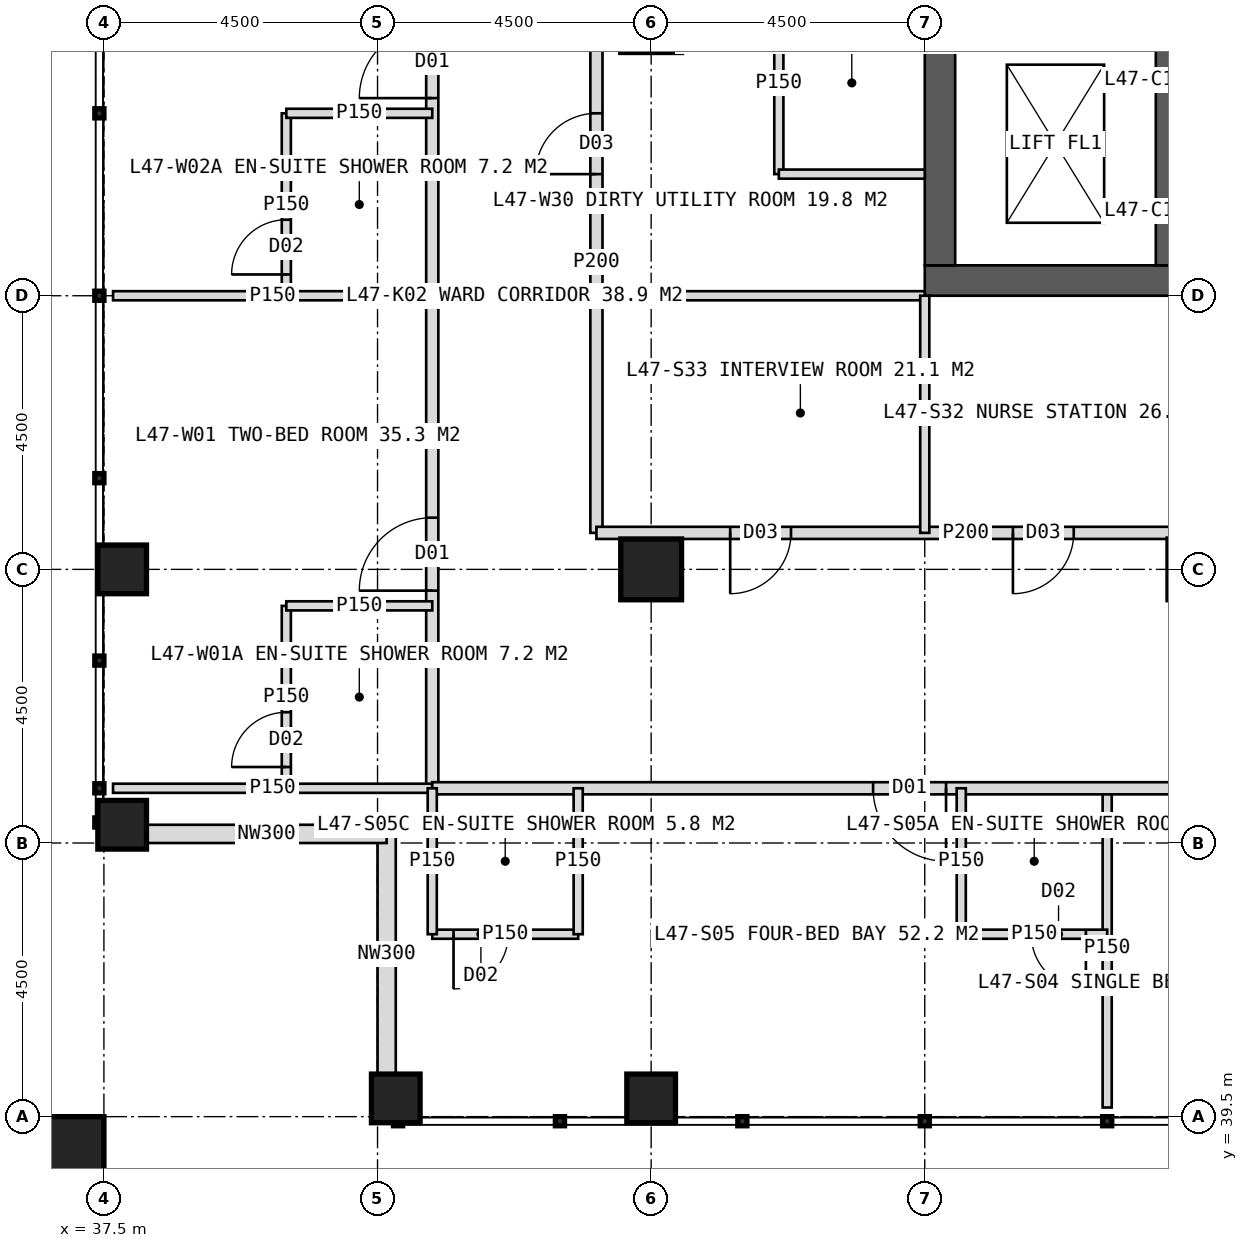
"""IFC4 building model, lengths in metres.
Left out: names, types, materials, properties, quantities, classifications, styles, units other than length and angle.
Written with IfcOpenShell. Run it as: python <this file> out.ifc"""

import sys

from ifc_helpers import new_model, si_unit, direction, frame, frame_2d, origin, origin_2d, place, context, subcontext, project, spatial, rectangle, hollow_rectangle, extrude, element, fill, save


model = new_model("IFC4")
c1 = context("Model", 3, precision=1e-05, world=origin(), true_north=direction((0.0, 1.0)))
c2 = subcontext(c1, "Body", "Model", "MODEL_VIEW")
j1 = project(units=[si_unit("LENGTHUNIT", "METRE"), si_unit("PLANEANGLEUNIT", "RADIAN")], contexts=[c1])
p1 = place(None, origin())
s1 = spatial("IfcSite", under=j1, at=p1, CompositionType="ELEMENT")
p2 = place(p1, origin())
s2 = spatial("IfcBuilding", under=s1, at=p2, CompositionType="ELEMENT")
p3 = place(p2, frame((0.0, 0.0, 197.0)))
s3 = spatial("IfcBuildingStorey", under=s2, at=p3, CompositionType="ELEMENT", Elevation=197.0)
p4 = place(p3, frame((51.0, 53.25, 0.0), z_axis=(0.0, 0.0, 1.0), x_axis=(1.0, 0.0, 0.0)))
e1 = element("IfcWall", 1, at=p4, inside=s3, PredefinedType="SHEAR", context=c2, shape_type="SweptSolid", body=[
    extrude(rectangle(XDim=18.0, YDim=0.5, at=frame_2d((9.0, 0.0))), origin(), (0.0, 0.0, 1.0), 4.0),
])
p5 = place(p4, frame((8.1, 0.0, 0.0)))
e2 = element("IfcOpeningElement", 2, at=p5, cuts=e1, PredefinedType="OPENING", context=c2, shape_type="SweptSolid", body=[
    extrude(rectangle(XDim=1.8, YDim=2.2, at=frame_2d((0.9, 1.1))), frame((0.0, 0.26, 0.0), z_axis=(0.0, -1.0, 0.0), x_axis=(1.0, 0.0, 0.0)), (0.0, 0.0, 1.0), 0.52),
])
p6 = place(p3, frame((51.25, 53.5, 0.0), z_axis=(0.0, 0.0, 1.0), x_axis=(0.0, 1.0, 0.0)))
e3 = element("IfcWall", 3, at=p6, inside=s3, PredefinedType="SHEAR", context=c2, shape_type="SweptSolid", body=[
    extrude(rectangle(XDim=17.0, YDim=0.5, at=frame_2d((8.5, 0.0))), origin(), (0.0, 0.0, 1.0), 4.0),
])
p7 = place(p6, frame((6.1, 0.0, 0.0)))
e4 = element("IfcOpeningElement", 4, at=p7, cuts=e3, PredefinedType="OPENING", context=c2, shape_type="SweptSolid", body=[
    extrude(rectangle(XDim=1.5, YDim=2.2, at=frame_2d((0.75, 1.1))), frame((0.0, 0.26, 0.0), z_axis=(0.0, -1.0, 0.0), x_axis=(1.0, 0.0, 0.0)), (0.0, 0.0, 1.0), 0.52),
])
p8 = place(p3, frame((54.95, 53.5, 0.0), z_axis=(0.0, 0.0, 1.0), x_axis=(0.0, 1.0, 0.0)))
e5 = element("IfcWall", 5, at=p8, inside=s3, PredefinedType="SHEAR", context=c2, shape_type="SweptSolid", body=[
    extrude(rectangle(XDim=17.0, YDim=0.3, at=frame_2d((8.5, 0.0))), origin(), (0.0, 0.0, 1.0), 4.0),
])
p9 = place(p3, frame((46.5, 48.5, 0.0), z_axis=(0.0, 0.0, 1.0), x_axis=(1.0, 0.0, 0.0)))
e6 = element("IfcColumn", 6, at=p9, inside=s3, PredefinedType="COLUMN", context=c2, shape_type="SweptSolid", body=[
    extrude(hollow_rectangle(XDim=1.0, YDim=1.0, WallThickness=0.1, at=origin_2d()), origin(), (0.0, 0.0, 1.0), 4.0),
])
for number, where, z_axis, x_axis in (
    (7, (42.3, 39.8, 0.0), (0.0, 0.0, 1.0), (1.0, 0.0, 0.0)),
    (8, (37.8, 44.3, 0.0), (0.0, 0.0, 1.0), (1.0, 0.0, 0.0)),
    (9, (46.5, 39.8, 0.0), (0.0, 0.0, 1.0), (1.0, 0.0, 0.0)),
    (10, (37.8, 48.5, 0.0), (0.0, 0.0, 1.0), (1.0, 0.0, 0.0)),
):
    element("IfcColumn", number, at=place(p3, frame(where, z_axis=z_axis, x_axis=x_axis)), inside=s3, PredefinedType="COLUMN", context=c2, shape_type="SweptSolid", body=[
        extrude(hollow_rectangle(XDim=0.8, YDim=0.8, WallThickness=0.08, at=origin_2d()), origin(), (0.0, 0.0, 1.0), 4.0),
    ])
p10 = place(p3, frame((36.9, 38.9, 0.0), z_axis=(0.0, 0.0, 1.0), x_axis=(1.0, 0.0, 0.0)))
e11 = element("IfcColumn", 11, at=p10, inside=s3, PredefinedType="COLUMN", context=c2, shape_type="SweptSolid", body=[
    extrude(hollow_rectangle(XDim=1.2, YDim=1.2, WallThickness=0.07, at=origin_2d()), origin(), (0.0, 0.0, 1.0), 4.0),
])
for number, where, z_axis, x_axis in (
    (12, (42.15, 40.2, 0.0), (0.0, 0.0, 1.0), (0.0, 1.0, 0.0)),
    (13, (42.15, 44.15, 0.0), (0.0, 0.0, 1.0), (-1.0, 0.0, 0.0)),
):
    element("IfcWall", number, at=place(p3, frame(where, z_axis=z_axis, x_axis=x_axis)), inside=s3, PredefinedType="ELEMENTEDWALL", context=c2, shape_type="SweptSolid", body=[
        extrude(rectangle(XDim=3.95, YDim=0.3, at=frame_2d((1.975, 0.0))), origin(), (0.0, 0.0, 1.0), 2.85),
    ])
p11 = place(p3, frame((42.9, 53.0, 0.0), z_axis=(0.0, 0.0, 1.0), x_axis=(-1.0, 0.0, 0.0)))
e14 = element("IfcWall", 14, at=p11, inside=s3, PredefinedType="PARTITIONING", context=c2, shape_type="SweptSolid", body=[
    extrude(rectangle(XDim=5.25, YDim=0.15, at=frame_2d((2.625, 0.0))), origin(), (0.0, 0.0, 1.0), 3.75),
])
p12 = place(p3, frame((42.9, 44.9, 0.0), z_axis=(0.0, 0.0, 1.0), x_axis=(0.0, 1.0, 0.0)))
e15 = element("IfcWall", 15, at=p12, inside=s3, PredefinedType="PARTITIONING", context=c2, shape_type="SweptSolid", body=[
    extrude(rectangle(XDim=34.2, YDim=0.2, at=frame_2d((17.1, 0.0))), origin(), (0.0, 0.0, 1.0), 3.75),
])
p13 = place(p12, frame((3.25, 0.0, 0.0)))
e16 = element("IfcOpeningElement", 16, at=p13, cuts=e15, PredefinedType="OPENING", context=c2, shape_type="SweptSolid", body=[
    extrude(rectangle(XDim=1.2, YDim=2.2, at=frame_2d((0.6, 1.1))), frame((0.0, 0.11, 0.0), z_axis=(0.0, -1.0, 0.0), x_axis=(1.0, 0.0, 0.0)), (0.0, 0.0, 1.0), 0.22),
])
p14 = place(p12, frame((11.35, 0.0, 0.0)))
e17 = element("IfcOpeningElement", 17, at=p14, cuts=e15, PredefinedType="OPENING", context=c2, shape_type="SweptSolid", body=[
    extrude(rectangle(XDim=1.2, YDim=2.2, at=frame_2d((0.6, 1.1))), frame((0.0, 0.11, 0.0), z_axis=(0.0, -1.0, 0.0), x_axis=(1.0, 0.0, 0.0)), (0.0, 0.0, 1.0), 0.22),
])
p15 = place(p12, frame((20.35, 0.0, 0.0)))
e18 = element("IfcOpeningElement", 18, at=p15, cuts=e15, PredefinedType="OPENING", context=c2, shape_type="SweptSolid", body=[
    extrude(rectangle(XDim=1.2, YDim=2.2, at=frame_2d((0.6, 1.1))), frame((0.0, 0.11, 0.0), z_axis=(0.0, -1.0, 0.0), x_axis=(1.0, 0.0, 0.0)), (0.0, 0.0, 1.0), 0.22),
])
p16 = place(p12, frame((29.35, 0.0, 0.0)))
e19 = element("IfcOpeningElement", 19, at=p16, cuts=e15, PredefinedType="OPENING", context=c2, shape_type="SweptSolid", body=[
    extrude(rectangle(XDim=1.2, YDim=2.2, at=frame_2d((0.6, 1.1))), frame((0.0, 0.11, 0.0), z_axis=(0.0, -1.0, 0.0), x_axis=(1.0, 0.0, 0.0)), (0.0, 0.0, 1.0), 0.22),
])
p17 = place(p3, frame((42.9, 44.9, 0.0), z_axis=(0.0, 0.0, 1.0), x_axis=(-1.0, 0.0, 0.0)))
e20 = element("IfcWall", 20, at=p17, inside=s3, PredefinedType="PARTITIONING", context=c2, shape_type="SweptSolid", body=[
    extrude(rectangle(XDim=5.25, YDim=0.15, at=frame_2d((2.625, 0.0))), origin(), (0.0, 0.0, 1.0), 3.75),
])
p18 = place(p3, frame((40.5, 44.9, 0.0), z_axis=(0.0, 0.0, 1.0), x_axis=(0.0, 1.0, 0.0)))
e21 = element("IfcWall", 21, at=p18, inside=s3, PredefinedType="PARTITIONING", context=c2, shape_type="SweptSolid", body=[
    extrude(rectangle(XDim=3.0, YDim=0.15, at=frame_2d((1.5, 0.0))), origin(), (0.0, 0.0, 1.0), 3.75),
])
p19 = place(p18, frame((0.35, 0.0, 0.0)))
e22 = element("IfcOpeningElement", 22, at=p19, cuts=e21, PredefinedType="OPENING", context=c2, shape_type="SweptSolid", body=[
    extrude(rectangle(XDim=0.9, YDim=2.1, at=frame_2d((0.45, 1.05))), frame((0.0, 0.085, 0.0), z_axis=(0.0, -1.0, 0.0), x_axis=(1.0, 0.0, 0.0)), (0.0, 0.0, 1.0), 0.17),
])
p20 = place(p3, frame((42.9, 47.9, 0.0), z_axis=(0.0, 0.0, 1.0), x_axis=(-1.0, 0.0, 0.0)))
e23 = element("IfcWall", 23, at=p20, inside=s3, PredefinedType="PARTITIONING", context=c2, shape_type="SweptSolid", body=[
    extrude(rectangle(XDim=2.4, YDim=0.15, at=frame_2d((1.2, 0.0))), origin(), (0.0, 0.0, 1.0), 3.75),
])
p21 = place(p3, frame((40.5, 53.0, 0.0), z_axis=(0.0, 0.0, 1.0), x_axis=(0.0, 1.0, 0.0)))
e24 = element("IfcWall", 24, at=p21, inside=s3, PredefinedType="PARTITIONING", context=c2, shape_type="SweptSolid", body=[
    extrude(rectangle(XDim=3.0, YDim=0.15, at=frame_2d((1.5, 0.0))), origin(), (0.0, 0.0, 1.0), 3.75),
])
p22 = place(p21, frame((0.35, 0.0, 0.0)))
e25 = element("IfcOpeningElement", 25, at=p22, cuts=e24, PredefinedType="OPENING", context=c2, shape_type="SweptSolid", body=[
    extrude(rectangle(XDim=0.9, YDim=2.1, at=frame_2d((0.45, 1.05))), frame((0.0, 0.085, 0.0), z_axis=(0.0, -1.0, 0.0), x_axis=(1.0, 0.0, 0.0)), (0.0, 0.0, 1.0), 0.17),
])
p23 = place(p3, frame((42.9, 56.0, 0.0), z_axis=(0.0, 0.0, 1.0), x_axis=(-1.0, 0.0, 0.0)))
e26 = element("IfcWall", 26, at=p23, inside=s3, PredefinedType="PARTITIONING", context=c2, shape_type="SweptSolid", body=[
    extrude(rectangle(XDim=2.4, YDim=0.15, at=frame_2d((1.2, 0.0))), origin(), (0.0, 0.0, 1.0), 3.75),
])
p24 = place(p3, frame((51.0, 53.0, 0.0), z_axis=(0.0, 0.0, 1.0), x_axis=(-1.0, 0.0, 0.0)))
e27 = element("IfcWall", 27, at=p24, inside=s3, PredefinedType="PARTITIONING", context=c2, shape_type="SweptSolid", body=[
    extrude(rectangle(XDim=5.4, YDim=0.15, at=frame_2d((2.7, 0.0))), origin(), (0.0, 0.0, 1.0), 3.75),
])
p25 = place(p3, frame((45.6, 49.1, 0.0), z_axis=(0.0, 0.0, 1.0), x_axis=(0.0, 1.0, 0.0)))
e28 = element("IfcWall", 28, at=p25, inside=s3, PredefinedType="PARTITIONING", context=c2, shape_type="SweptSolid", body=[
    extrude(rectangle(XDim=8.9, YDim=0.2, at=frame_2d((4.45, 0.0))), origin(), (0.0, 0.0, 1.0), 3.75),
])
p26 = place(p25, frame((5.9, 0.0, 0.0)))
e29 = element("IfcOpeningElement", 29, at=p26, cuts=e28, PredefinedType="OPENING", context=c2, shape_type="SweptSolid", body=[
    extrude(rectangle(XDim=1.0, YDim=2.1, at=frame_2d((0.5, 1.05))), frame((0.0, 0.11, 0.0), z_axis=(0.0, -1.0, 0.0), x_axis=(1.0, 0.0, 0.0)), (0.0, 0.0, 1.0), 0.22),
])
p27 = place(p3, frame((48.6, 55.0, 0.0), z_axis=(0.0, 0.0, 1.0), x_axis=(0.0, 1.0, 0.0)))
e30 = element("IfcWall", 30, at=p27, inside=s3, PredefinedType="PARTITIONING", context=c2, shape_type="SweptSolid", body=[
    extrude(rectangle(XDim=3.0, YDim=0.15, at=frame_2d((1.5, 0.0))), origin(), (0.0, 0.0, 1.0), 3.75),
])
p28 = place(p3, frame((51.0, 55.0, 0.0), z_axis=(0.0, 0.0, 1.0), x_axis=(-1.0, 0.0, 0.0)))
e31 = element("IfcWall", 31, at=p28, inside=s3, PredefinedType="PARTITIONING", context=c2, shape_type="SweptSolid", body=[
    extrude(rectangle(XDim=2.4, YDim=0.15, at=frame_2d((1.2, 0.0))), origin(), (0.0, 0.0, 1.0), 3.75),
])
p29 = place(p3, frame((54.0, 44.9, 0.0), z_axis=(0.0, 0.0, 1.0), x_axis=(0.0, -1.0, 0.0)))
e32 = element("IfcWall", 32, at=p29, inside=s3, PredefinedType="PARTITIONING", context=c2, shape_type="SweptSolid", body=[
    extrude(rectangle(XDim=5.25, YDim=0.15, at=frame_2d((2.625, 0.0))), origin(), (0.0, 0.0, 1.0), 3.75),
])
p30 = place(p3, frame((77.1, 44.9, 0.0), z_axis=(0.0, 0.0, 1.0), x_axis=(-1.0, 0.0, 0.0)))
e33 = element("IfcWall", 33, at=p30, inside=s3, PredefinedType="PARTITIONING", context=c2, shape_type="SweptSolid", body=[
    extrude(rectangle(XDim=34.2, YDim=0.2, at=frame_2d((17.1, 0.0))), origin(), (0.0, 0.0, 1.0), 3.75),
])
p31 = place(p30, frame((2.65, 0.0, 0.0)))
e34 = element("IfcOpeningElement", 34, at=p31, cuts=e33, PredefinedType="OPENING", context=c2, shape_type="SweptSolid", body=[
    extrude(rectangle(XDim=1.2, YDim=2.2, at=frame_2d((0.6, 1.1))), frame((0.0, 0.11, 0.0), z_axis=(0.0, -1.0, 0.0), x_axis=(1.0, 0.0, 0.0)), (0.0, 0.0, 1.0), 0.22),
])
p32 = place(p30, frame((7.75, 0.0, 0.0)))
e35 = element("IfcOpeningElement", 35, at=p32, cuts=e33, PredefinedType="OPENING", context=c2, shape_type="SweptSolid", body=[
    extrude(rectangle(XDim=1.2, YDim=2.2, at=frame_2d((0.6, 1.1))), frame((0.0, 0.11, 0.0), z_axis=(0.0, -1.0, 0.0), x_axis=(1.0, 0.0, 0.0)), (0.0, 0.0, 1.0), 0.22),
])
p33 = place(p30, frame((13.75, 0.0, 0.0)))
e36 = element("IfcOpeningElement", 36, at=p33, cuts=e33, PredefinedType="OPENING", context=c2, shape_type="SweptSolid", body=[
    extrude(rectangle(XDim=1.2, YDim=2.2, at=frame_2d((0.6, 1.1))), frame((0.0, 0.11, 0.0), z_axis=(0.0, -1.0, 0.0), x_axis=(1.0, 0.0, 0.0)), (0.0, 0.0, 1.0), 0.22),
])
p34 = place(p30, frame((19.75, 0.0, 0.0)))
e37 = element("IfcOpeningElement", 37, at=p34, cuts=e33, PredefinedType="OPENING", context=c2, shape_type="SweptSolid", body=[
    extrude(rectangle(XDim=1.2, YDim=2.2, at=frame_2d((0.6, 1.1))), frame((0.0, 0.11, 0.0), z_axis=(0.0, -1.0, 0.0), x_axis=(1.0, 0.0, 0.0)), (0.0, 0.0, 1.0), 0.22),
])
p35 = place(p30, frame((25.75, 0.0, 0.0)))
e38 = element("IfcOpeningElement", 38, at=p35, cuts=e33, PredefinedType="OPENING", context=c2, shape_type="SweptSolid", body=[
    extrude(rectangle(XDim=1.2, YDim=2.2, at=frame_2d((0.6, 1.1))), frame((0.0, 0.11, 0.0), z_axis=(0.0, -1.0, 0.0), x_axis=(1.0, 0.0, 0.0)), (0.0, 0.0, 1.0), 0.22),
])
p36 = place(p3, frame((54.0, 42.5, 0.0), z_axis=(0.0, 0.0, 1.0), x_axis=(-1.0, 0.0, 0.0)))
e39 = element("IfcWall", 39, at=p36, inside=s3, PredefinedType="PARTITIONING", context=c2, shape_type="SweptSolid", body=[
    extrude(rectangle(XDim=2.4, YDim=0.15, at=frame_2d((1.2, 0.0))), origin(), (0.0, 0.0, 1.0), 3.75),
])
p37 = place(p36, frame((0.35, 0.0, 0.0)))
e40 = element("IfcOpeningElement", 40, at=p37, cuts=e39, PredefinedType="OPENING", context=c2, shape_type="SweptSolid", body=[
    extrude(rectangle(XDim=0.9, YDim=2.1, at=frame_2d((0.45, 1.05))), frame((0.0, 0.085, 0.0), z_axis=(0.0, -1.0, 0.0), x_axis=(1.0, 0.0, 0.0)), (0.0, 0.0, 1.0), 0.17),
])
p38 = place(p3, frame((51.6, 44.9, 0.0), z_axis=(0.0, 0.0, 1.0), x_axis=(0.0, -1.0, 0.0)))
e41 = element("IfcWall", 41, at=p38, inside=s3, PredefinedType="PARTITIONING", context=c2, shape_type="SweptSolid", body=[
    extrude(rectangle(XDim=2.4, YDim=0.15, at=frame_2d((1.2, 0.0))), origin(), (0.0, 0.0, 1.0), 3.75),
])
p39 = place(p3, frame((45.3, 42.5, 0.0), z_axis=(0.0, 0.0, 1.0), x_axis=(-1.0, 0.0, 0.0)))
e42 = element("IfcWall", 42, at=p39, inside=s3, PredefinedType="PARTITIONING", context=c2, shape_type="SweptSolid", body=[
    extrude(rectangle(XDim=2.4, YDim=0.15, at=frame_2d((1.2, 0.0))), origin(), (0.0, 0.0, 1.0), 3.75),
])
p40 = place(p39, frame((1.15, 0.0, 0.0)))
e43 = element("IfcOpeningElement", 43, at=p40, cuts=e42, PredefinedType="OPENING", context=c2, shape_type="SweptSolid", body=[
    extrude(rectangle(XDim=0.9, YDim=2.1, at=frame_2d((0.45, 1.05))), frame((0.0, 0.085, 0.0), z_axis=(0.0, -1.0, 0.0), x_axis=(1.0, 0.0, 0.0)), (0.0, 0.0, 1.0), 0.17),
])
for number, where, z_axis, x_axis in (
    (44, (45.3, 44.9, 0.0), (0.0, 0.0, 1.0), (0.0, -1.0, 0.0)),
    (45, (42.9, 44.9, 0.0), (0.0, 0.0, 1.0), (0.0, -1.0, 0.0)),
):
    element("IfcWall", number, at=place(p3, frame(where, z_axis=z_axis, x_axis=x_axis)), inside=s3, PredefinedType="PARTITIONING", context=c2, shape_type="SweptSolid", body=[
        extrude(rectangle(XDim=2.4, YDim=0.15, at=frame_2d((1.2, 0.0))), origin(), (0.0, 0.0, 1.0), 3.75),
    ])
p41 = place(p3, frame((57.75, 49.1, 0.0), z_axis=(0.0, 0.0, 1.0), x_axis=(-1.0, 0.0, 0.0)))
e46 = element("IfcWall", 46, at=p41, inside=s3, PredefinedType="PARTITIONING", context=c2, shape_type="SweptSolid", body=[
    extrude(rectangle(XDim=12.15, YDim=0.2, at=frame_2d((6.075, 0.0))), origin(), (0.0, 0.0, 1.0), 3.75),
])
p42 = place(p41, frame((4.3, 0.0, 0.0)))
e47 = element("IfcOpeningElement", 47, at=p42, cuts=e46, PredefinedType="OPENING", context=c2, shape_type="SweptSolid", body=[
    extrude(rectangle(XDim=1.0, YDim=2.1, at=frame_2d((0.5, 1.05))), frame((0.0, 0.11, 0.0), z_axis=(0.0, -1.0, 0.0), x_axis=(1.0, 0.0, 0.0)), (0.0, 0.0, 1.0), 0.22),
])
p43 = place(p41, frame((8.95, 0.0, 0.0)))
e48 = element("IfcOpeningElement", 48, at=p43, cuts=e46, PredefinedType="OPENING", context=c2, shape_type="SweptSolid", body=[
    extrude(rectangle(XDim=1.0, YDim=2.1, at=frame_2d((0.5, 1.05))), frame((0.0, 0.11, 0.0), z_axis=(0.0, -1.0, 0.0), x_axis=(1.0, 0.0, 0.0)), (0.0, 0.0, 1.0), 0.22),
])
p44 = place(p3, frame((51.0, 53.0, 0.0), z_axis=(0.0, 0.0, 1.0), x_axis=(0.0, -1.0, 0.0)))
e49 = element("IfcWall", 49, at=p44, inside=s3, PredefinedType="PARTITIONING", context=c2, shape_type="SweptSolid", body=[
    extrude(rectangle(XDim=3.9, YDim=0.15, at=frame_2d((1.95, 0.0))), origin(), (0.0, 0.0, 1.0), 3.75),
])
p45 = place(p13, origin())
e50 = element("IfcDoor", 50, at=p45, inside=s3, OperationType="SINGLE_SWING_LEFT", PredefinedType="DOOR", context=c2, shape_type="SweptSolid", body=[
    extrude(rectangle(XDim=1.2, YDim=2.2, at=frame_2d((0.6, 1.1))), frame((0.0, 0.025, 0.0), z_axis=(0.0, -1.0, 0.0), x_axis=(1.0, 0.0, 0.0)), (0.0, 0.0, 1.0), 0.05),
])
fill(e16, e50)
p46 = place(p19, origin())
e51 = element("IfcDoor", 51, at=p46, inside=s3, OperationType="SINGLE_SWING_LEFT", PredefinedType="DOOR", context=c2, shape_type="SweptSolid", body=[
    extrude(rectangle(XDim=0.9, YDim=2.1, at=frame_2d((0.45, 1.05))), frame((0.0, 0.025, 0.0), z_axis=(0.0, -1.0, 0.0), x_axis=(1.0, 0.0, 0.0)), (0.0, 0.0, 1.0), 0.05),
])
fill(e22, e51)
p47 = place(p14, origin())
e52 = element("IfcDoor", 52, at=p47, inside=s3, OperationType="SINGLE_SWING_LEFT", PredefinedType="DOOR", context=c2, shape_type="SweptSolid", body=[
    extrude(rectangle(XDim=1.2, YDim=2.2, at=frame_2d((0.6, 1.1))), frame((0.0, 0.025, 0.0), z_axis=(0.0, -1.0, 0.0), x_axis=(1.0, 0.0, 0.0)), (0.0, 0.0, 1.0), 0.05),
])
fill(e17, e52)
p48 = place(p22, origin())
e53 = element("IfcDoor", 53, at=p48, inside=s3, OperationType="SINGLE_SWING_LEFT", PredefinedType="DOOR", context=c2, shape_type="SweptSolid", body=[
    extrude(rectangle(XDim=0.9, YDim=2.1, at=frame_2d((0.45, 1.05))), frame((0.0, 0.025, 0.0), z_axis=(0.0, -1.0, 0.0), x_axis=(1.0, 0.0, 0.0)), (0.0, 0.0, 1.0), 0.05),
])
fill(e25, e53)
p49 = place(p26, origin())
e54 = element("IfcDoor", 54, at=p49, inside=s3, OperationType="SINGLE_SWING_LEFT", PredefinedType="DOOR", context=c2, shape_type="SweptSolid", body=[
    extrude(rectangle(XDim=1.0, YDim=2.1, at=frame_2d((0.5, 1.05))), frame((0.0, 0.025, 0.0), z_axis=(0.0, -1.0, 0.0), x_axis=(1.0, 0.0, 0.0)), (0.0, 0.0, 1.0), 0.05),
])
fill(e29, e54)
p50 = place(p35, origin())
e55 = element("IfcDoor", 55, at=p50, inside=s3, OperationType="SINGLE_SWING_LEFT", PredefinedType="DOOR", context=c2, shape_type="SweptSolid", body=[
    extrude(rectangle(XDim=1.2, YDim=2.2, at=frame_2d((0.6, 1.1))), frame((0.0, 0.025, 0.0), z_axis=(0.0, -1.0, 0.0), x_axis=(1.0, 0.0, 0.0)), (0.0, 0.0, 1.0), 0.05),
])
fill(e38, e55)
p51 = place(p37, origin())
e56 = element("IfcDoor", 56, at=p51, inside=s3, OperationType="SINGLE_SWING_LEFT", PredefinedType="DOOR", context=c2, shape_type="SweptSolid", body=[
    extrude(rectangle(XDim=0.9, YDim=2.1, at=frame_2d((0.45, 1.05))), frame((0.0, 0.025, 0.0), z_axis=(0.0, -1.0, 0.0), x_axis=(1.0, 0.0, 0.0)), (0.0, 0.0, 1.0), 0.05),
])
fill(e40, e56)
p52 = place(p40, origin())
e57 = element("IfcDoor", 57, at=p52, inside=s3, OperationType="SINGLE_SWING_RIGHT", PredefinedType="DOOR", context=c2, shape_type="SweptSolid", body=[
    extrude(rectangle(XDim=0.9, YDim=2.1, at=frame_2d((0.45, 1.05))), frame((0.0, 0.025, 0.0), z_axis=(0.0, -1.0, 0.0), x_axis=(1.0, 0.0, 0.0)), (0.0, 0.0, 1.0), 0.05),
])
fill(e43, e57)
p53 = place(p42, origin())
e58 = element("IfcDoor", 58, at=p53, inside=s3, OperationType="SINGLE_SWING_RIGHT", PredefinedType="DOOR", context=c2, shape_type="SweptSolid", body=[
    extrude(rectangle(XDim=1.0, YDim=2.1, at=frame_2d((0.5, 1.05))), frame((0.0, 0.025, 0.0), z_axis=(0.0, -1.0, 0.0), x_axis=(1.0, 0.0, 0.0)), (0.0, 0.0, 1.0), 0.05),
])
fill(e47, e58)
p54 = place(p43, origin())
e59 = element("IfcDoor", 59, at=p54, inside=s3, OperationType="SINGLE_SWING_RIGHT", PredefinedType="DOOR", context=c2, shape_type="SweptSolid", body=[
    extrude(rectangle(XDim=1.0, YDim=2.1, at=frame_2d((0.5, 1.05))), frame((0.0, 0.025, 0.0), z_axis=(0.0, -1.0, 0.0), x_axis=(1.0, 0.0, 0.0)), (0.0, 0.0, 1.0), 0.05),
])
fill(e48, e59)
save(model, sys.argv[1])
